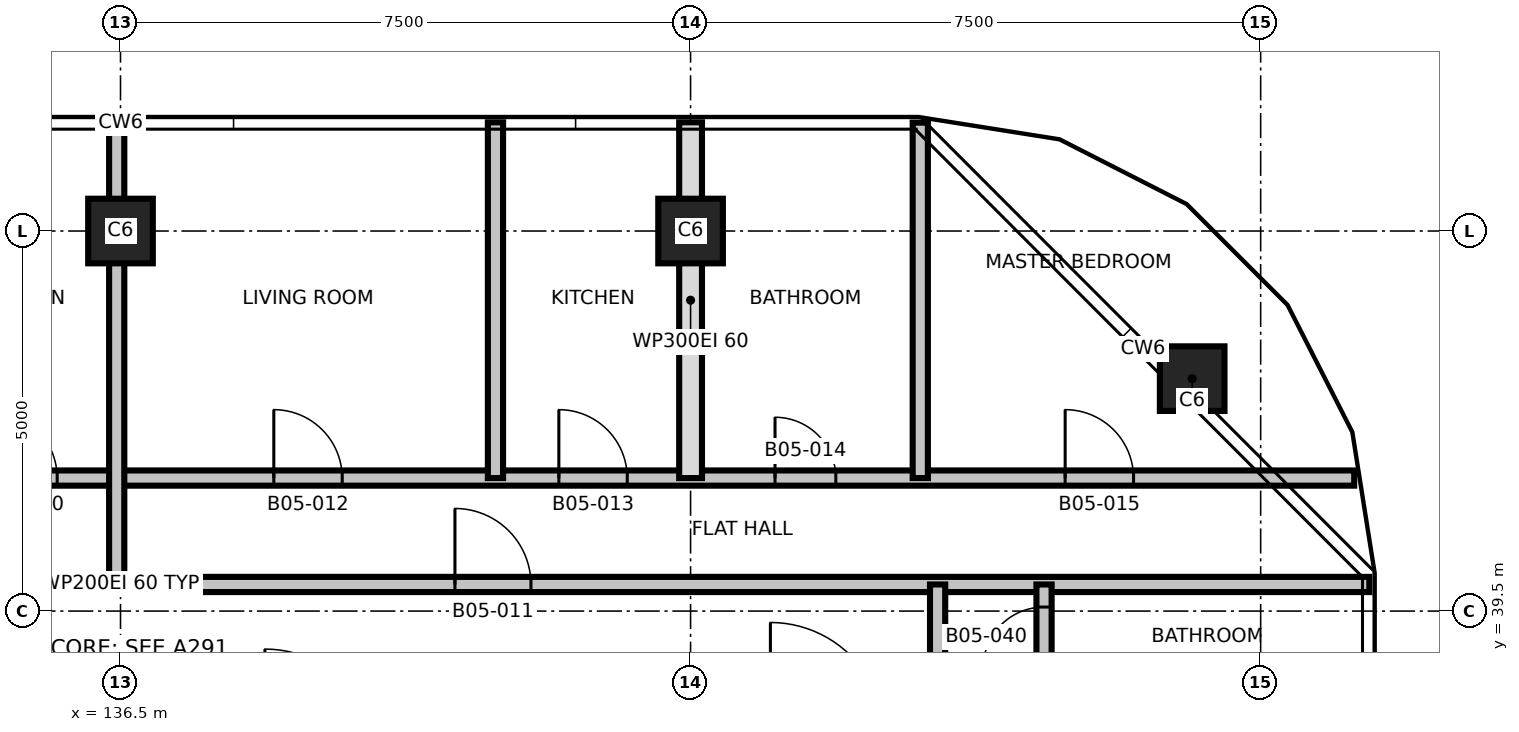
"""IFC4 building model, lengths in metres.
Left out: names, types, materials, properties, quantities, classifications, styles, units other than length and angle.
Written with IfcOpenShell. Run it as: python <this file> out.ifc"""

import sys

from ifc_helpers import new_model, si_unit, direction, frame, frame_2d, origin, origin_2d, place, context, subcontext, project, spatial, rectangle, extrude, element, fill, save


model = new_model("IFC4")
c1 = context("Model", 3, precision=1e-05, world=origin(), true_north=direction((0.0, 1.0)))
c2 = subcontext(c1, "Body", "Model", "MODEL_VIEW")
j1 = project(units=[si_unit("LENGTHUNIT", "METRE"), si_unit("PLANEANGLEUNIT", "RADIAN")], contexts=[c1])
p1 = place(None, origin())
s1 = spatial("IfcSite", under=j1, at=p1, CompositionType="ELEMENT")
p2 = place(p1, origin())
s2 = spatial("IfcBuilding", under=s1, at=p2, CompositionType="ELEMENT")
p3 = place(p2, frame((0.0, 0.0, 74.2)))
s3 = spatial("IfcBuildingStorey", under=s2, at=p3, CompositionType="ELEMENT", Elevation=74.2)
for number, where, z_axis, x_axis in (
    (1, (150.599, 42.558, 0.0), (0.0, 0.0, 1.0), (1.0, 0.0, 0.0)),
    (2, (136.5, 44.5, 0.0), (0.0, 0.0, 1.0), (1.0, 0.0, 0.0)),
    (3, (144.0, 44.5, 0.0), (0.0, 0.0, 1.0), (1.0, 0.0, 0.0)),
):
    element("IfcColumn", number, at=place(p3, frame(where, z_axis=z_axis, x_axis=x_axis)), inside=s3, PredefinedType="COLUMN", context=c2, shape_type="SweptSolid", body=[
        extrude(rectangle(XDim=0.85, YDim=0.85, at=origin_2d()), origin(), (0.0, 0.0, 1.0), 3.7),
    ])
p4 = place(p3, frame((120.07, 39.85, 0.0), z_axis=(0.0, 0.0, 1.0), x_axis=(1.0, 0.0, 0.0)))
e4 = element("IfcWall", 4, at=p4, inside=s3, PredefinedType="PARTITIONING", context=c2, shape_type="SweptSolid", body=[
    extrude(rectangle(XDim=32.86, YDim=0.2, at=frame_2d((16.43, 0.0))), origin(), (0.0, 0.0, 1.0), 3.4),
])
p5 = place(p4, frame((11.03, 0.0, 0.0)))
e5 = element("IfcOpeningElement", 5, at=p5, cuts=e4, PredefinedType="OPENING", context=c2, shape_type="SweptSolid", body=[
    extrude(rectangle(XDim=1.0, YDim=2.1, at=frame_2d((0.5, 1.05))), frame((0.0, 0.11, 0.0), z_axis=(0.0, -1.0, 0.0), x_axis=(1.0, 0.0, 0.0)), (0.0, 0.0, 1.0), 0.22),
])
p6 = place(p4, frame((20.83, 0.0, 0.0)))
e6 = element("IfcOpeningElement", 6, at=p6, cuts=e4, PredefinedType="OPENING", context=c2, shape_type="SweptSolid", body=[
    extrude(rectangle(XDim=1.0, YDim=2.1, at=frame_2d((0.5, 1.05))), frame((0.0, 0.11, 0.0), z_axis=(0.0, -1.0, 0.0), x_axis=(1.0, 0.0, 0.0)), (0.0, 0.0, 1.0), 0.22),
])
p7 = place(p3, frame((120.269, 41.25, 0.0), z_axis=(0.0, 0.0, 1.0), x_axis=(1.0, 0.0, 0.0)))
e7 = element("IfcWall", 7, at=p7, inside=s3, PredefinedType="PARTITIONING", context=c2, shape_type="SweptSolid", body=[
    extrude(rectangle(XDim=32.462, YDim=0.2, at=frame_2d((16.231, 0.0))), origin(), (0.0, 0.0, 1.0), 3.4),
])
p8 = place(p7, frame((0.414, 0.0, 0.0)))
e8 = element("IfcOpeningElement", 8, at=p8, cuts=e7, PredefinedType="OPENING", context=c2, shape_type="SweptSolid", body=[
    extrude(rectangle(XDim=0.9, YDim=2.1, at=frame_2d((0.45, 1.05))), frame((0.0, 0.11, 0.0), z_axis=(0.0, -1.0, 0.0), x_axis=(1.0, 0.0, 0.0)), (0.0, 0.0, 1.0), 0.22),
])
p9 = place(p7, frame((4.581, 0.0, 0.0)))
e9 = element("IfcOpeningElement", 9, at=p9, cuts=e7, PredefinedType="OPENING", context=c2, shape_type="SweptSolid", body=[
    extrude(rectangle(XDim=0.9, YDim=2.1, at=frame_2d((0.45, 1.05))), frame((0.0, 0.11, 0.0), z_axis=(0.0, -1.0, 0.0), x_axis=(1.0, 0.0, 0.0)), (0.0, 0.0, 1.0), 0.22),
])
p10 = place(p7, frame((7.381, 0.0, 0.0)))
e10 = element("IfcOpeningElement", 10, at=p10, cuts=e7, PredefinedType="OPENING", context=c2, shape_type="SweptSolid", body=[
    extrude(rectangle(XDim=0.8, YDim=2.1, at=frame_2d((0.4, 1.05))), frame((0.0, 0.11, 0.0), z_axis=(0.0, -1.0, 0.0), x_axis=(1.0, 0.0, 0.0)), (0.0, 0.0, 1.0), 0.22),
])
p11 = place(p7, frame((10.748, 0.0, 0.0)))
e11 = element("IfcOpeningElement", 11, at=p11, cuts=e7, PredefinedType="OPENING", context=c2, shape_type="SweptSolid", body=[
    extrude(rectangle(XDim=0.9, YDim=2.1, at=frame_2d((0.45, 1.05))), frame((0.0, 0.11, 0.0), z_axis=(0.0, -1.0, 0.0), x_axis=(1.0, 0.0, 0.0)), (0.0, 0.0, 1.0), 0.22),
])
p12 = place(p7, frame((14.498, 0.0, 0.0)))
e12 = element("IfcOpeningElement", 12, at=p12, cuts=e7, PredefinedType="OPENING", context=c2, shape_type="SweptSolid", body=[
    extrude(rectangle(XDim=0.9, YDim=2.1, at=frame_2d((0.45, 1.05))), frame((0.0, 0.11, 0.0), z_axis=(0.0, -1.0, 0.0), x_axis=(1.0, 0.0, 0.0)), (0.0, 0.0, 1.0), 0.22),
])
p13 = place(p7, frame((18.248, 0.0, 0.0)))
e13 = element("IfcOpeningElement", 13, at=p13, cuts=e7, PredefinedType="OPENING", context=c2, shape_type="SweptSolid", body=[
    extrude(rectangle(XDim=0.9, YDim=2.1, at=frame_2d((0.45, 1.05))), frame((0.0, 0.11, 0.0), z_axis=(0.0, -1.0, 0.0), x_axis=(1.0, 0.0, 0.0)), (0.0, 0.0, 1.0), 0.22),
])
p14 = place(p7, frame((21.998, 0.0, 0.0)))
e14 = element("IfcOpeningElement", 14, at=p14, cuts=e7, PredefinedType="OPENING", context=c2, shape_type="SweptSolid", body=[
    extrude(rectangle(XDim=0.9, YDim=2.1, at=frame_2d((0.45, 1.05))), frame((0.0, 0.11, 0.0), z_axis=(0.0, -1.0, 0.0), x_axis=(1.0, 0.0, 0.0)), (0.0, 0.0, 1.0), 0.22),
])
p15 = place(p7, frame((24.842, 0.0, 0.0)))
e15 = element("IfcOpeningElement", 15, at=p15, cuts=e7, PredefinedType="OPENING", context=c2, shape_type="SweptSolid", body=[
    extrude(rectangle(XDim=0.8, YDim=2.1, at=frame_2d((0.4, 1.05))), frame((0.0, 0.11, 0.0), z_axis=(0.0, -1.0, 0.0), x_axis=(1.0, 0.0, 0.0)), (0.0, 0.0, 1.0), 0.22),
])
p16 = place(p7, frame((28.659, 0.0, 0.0)))
e16 = element("IfcOpeningElement", 16, at=p16, cuts=e7, PredefinedType="OPENING", context=c2, shape_type="SweptSolid", body=[
    extrude(rectangle(XDim=0.9, YDim=2.1, at=frame_2d((0.45, 1.05))), frame((0.0, 0.11, 0.0), z_axis=(0.0, -1.0, 0.0), x_axis=(1.0, 0.0, 0.0)), (0.0, 0.0, 1.0), 0.22),
])
p17 = place(p3, frame((136.45, 39.85, 0.0), z_axis=(0.0, 0.0, 1.0), x_axis=(0.0, 1.0, 0.0)))
e17 = element("IfcWall", 17, at=p17, inside=s3, PredefinedType="PARTITIONING", context=c2, shape_type="SweptSolid", body=[
    extrude(rectangle(XDim=6.08, YDim=0.2, at=frame_2d((3.04, 0.0))), origin(), (0.0, 0.0, 1.0), 3.4),
])
p18 = place(p3, frame((141.433, 41.25, 0.0), z_axis=(0.0, 0.0, 1.0), x_axis=(0.0, 1.0, 0.0)))
e18 = element("IfcWall", 18, at=p18, inside=s3, PredefinedType="PARTITIONING", context=c2, shape_type="SweptSolid", body=[
    extrude(rectangle(XDim=4.68, YDim=0.2, at=frame_2d((2.34, 0.0))), origin(), (0.0, 0.0, 1.0), 3.4),
])
p19 = place(p3, frame((144.0, 41.25, 0.0), z_axis=(0.0, 0.0, 1.0), x_axis=(0.0, 1.0, 0.0)))
e19 = element("IfcWall", 19, at=p19, inside=s3, PredefinedType="PARTITIONING", context=c2, shape_type="SweptSolid", body=[
    extrude(rectangle(XDim=4.68, YDim=0.3, at=frame_2d((2.34, 0.0))), origin(), (0.0, 0.0, 1.0), 3.4),
])
p20 = place(p3, frame((147.022, 41.25, 0.0), z_axis=(0.0, 0.0, 1.0), x_axis=(0.0, 1.0, 0.0)))
e20 = element("IfcWall", 20, at=p20, inside=s3, PredefinedType="PARTITIONING", context=c2, shape_type="SweptSolid", body=[
    extrude(rectangle(XDim=4.676, YDim=0.2, at=frame_2d((2.338, 0.0))), origin(), (0.0, 0.0, 1.0), 3.4),
])
p21 = place(p3, frame((147.25, 22.15, 0.0), z_axis=(0.0, 0.0, 1.0), x_axis=(0.0, 1.0, 0.0)))
e21 = element("IfcWall", 21, at=p21, inside=s3, PredefinedType="PARTITIONING", context=c2, shape_type="SweptSolid", body=[
    extrude(rectangle(XDim=17.7, YDim=0.2, at=frame_2d((8.85, 0.0))), origin(), (0.0, 0.0, 1.0), 3.4),
])
p22 = place(p21, frame((2.65, 0.0, 0.0)))
e22 = element("IfcOpeningElement", 22, at=p22, cuts=e21, PredefinedType="OPENING", context=c2, shape_type="SweptSolid", body=[
    extrude(rectangle(XDim=1.0, YDim=2.1, at=frame_2d((0.5, 1.05))), frame((0.0, 0.11, 0.0), z_axis=(0.0, -1.0, 0.0), x_axis=(1.0, 0.0, 0.0)), (0.0, 0.0, 1.0), 0.22),
])
p23 = place(p3, frame((148.65, 22.15, 0.0), z_axis=(0.0, 0.0, 1.0), x_axis=(0.0, 1.0, 0.0)))
e23 = element("IfcWall", 23, at=p23, inside=s3, PredefinedType="PARTITIONING", context=c2, shape_type="SweptSolid", body=[
    extrude(rectangle(XDim=17.7, YDim=0.2, at=frame_2d((8.85, 0.0))), origin(), (0.0, 0.0, 1.0), 3.4),
])
p24 = place(p23, frame((1.725, 0.0, 0.0)))
e24 = element("IfcOpeningElement", 24, at=p24, cuts=e23, PredefinedType="OPENING", context=c2, shape_type="SweptSolid", body=[
    extrude(rectangle(XDim=0.9, YDim=2.1, at=frame_2d((0.45, 1.05))), frame((0.0, 0.11, 0.0), z_axis=(0.0, -1.0, 0.0), x_axis=(1.0, 0.0, 0.0)), (0.0, 0.0, 1.0), 0.22),
])
p25 = place(p23, frame((6.867, 0.0, 0.0)))
e25 = element("IfcOpeningElement", 25, at=p25, cuts=e23, PredefinedType="OPENING", context=c2, shape_type="SweptSolid", body=[
    extrude(rectangle(XDim=0.9, YDim=2.1, at=frame_2d((0.45, 1.05))), frame((0.0, 0.11, 0.0), z_axis=(0.0, -1.0, 0.0), x_axis=(1.0, 0.0, 0.0)), (0.0, 0.0, 1.0), 0.22),
])
p26 = place(p23, frame((11.367, 0.0, 0.0)))
e26 = element("IfcOpeningElement", 26, at=p26, cuts=e23, PredefinedType="OPENING", context=c2, shape_type="SweptSolid", body=[
    extrude(rectangle(XDim=0.9, YDim=2.1, at=frame_2d((0.45, 1.05))), frame((0.0, 0.11, 0.0), z_axis=(0.0, -1.0, 0.0), x_axis=(1.0, 0.0, 0.0)), (0.0, 0.0, 1.0), 0.22),
])
p27 = place(p23, frame((14.378, 0.0, 0.0)))
e27 = element("IfcOpeningElement", 27, at=p27, cuts=e23, PredefinedType="OPENING", context=c2, shape_type="SweptSolid", body=[
    extrude(rectangle(XDim=0.9, YDim=2.1, at=frame_2d((0.45, 1.05))), frame((0.0, 0.11, 0.0), z_axis=(0.0, -1.0, 0.0), x_axis=(1.0, 0.0, 0.0)), (0.0, 0.0, 1.0), 0.22),
])
p28 = place(p23, frame((16.603, 0.0, 0.0)))
e28 = element("IfcOpeningElement", 28, at=p28, cuts=e23, PredefinedType="OPENING", context=c2, shape_type="SweptSolid", body=[
    extrude(rectangle(XDim=0.8, YDim=2.1, at=frame_2d((0.4, 1.05))), frame((0.0, 0.11, 0.0), z_axis=(0.0, -1.0, 0.0), x_axis=(1.0, 0.0, 0.0)), (0.0, 0.0, 1.0), 0.22),
])
p29 = place(p12, origin())
e29 = element("IfcDoor", 29, at=p29, inside=s3, OperationType="SINGLE_SWING_RIGHT", PredefinedType="DOOR", context=c2, shape_type="SweptSolid", body=[
    extrude(rectangle(XDim=0.9, YDim=2.1, at=frame_2d((0.45, 1.05))), frame((0.0, 0.025, 0.0), z_axis=(0.0, -1.0, 0.0), x_axis=(1.0, 0.0, 0.0)), (0.0, 0.0, 1.0), 0.05),
])
fill(e12, e29)
p30 = place(p6, origin())
e30 = element("IfcDoor", 30, at=p30, inside=s3, OperationType="SINGLE_SWING_LEFT", PredefinedType="DOOR", context=c2, shape_type="SweptSolid", body=[
    extrude(rectangle(XDim=1.0, YDim=2.1, at=frame_2d((0.5, 1.05))), frame((0.0, 0.025, 0.0), z_axis=(0.0, -1.0, 0.0), x_axis=(1.0, 0.0, 0.0)), (0.0, 0.0, 1.0), 0.05),
])
fill(e6, e30)
p31 = place(p13, origin())
e31 = element("IfcDoor", 31, at=p31, inside=s3, OperationType="SINGLE_SWING_RIGHT", PredefinedType="DOOR", context=c2, shape_type="SweptSolid", body=[
    extrude(rectangle(XDim=0.9, YDim=2.1, at=frame_2d((0.45, 1.05))), frame((0.0, 0.025, 0.0), z_axis=(0.0, -1.0, 0.0), x_axis=(1.0, 0.0, 0.0)), (0.0, 0.0, 1.0), 0.05),
])
fill(e13, e31)
p32 = place(p14, origin())
e32 = element("IfcDoor", 32, at=p32, inside=s3, OperationType="SINGLE_SWING_LEFT", PredefinedType="DOOR", context=c2, shape_type="SweptSolid", body=[
    extrude(rectangle(XDim=0.9, YDim=2.1, at=frame_2d((0.45, 1.05))), frame((0.0, 0.025, 0.0), z_axis=(0.0, -1.0, 0.0), x_axis=(1.0, 0.0, 0.0)), (0.0, 0.0, 1.0), 0.05),
])
fill(e14, e32)
p33 = place(p15, origin())
e33 = element("IfcDoor", 33, at=p33, inside=s3, OperationType="SINGLE_SWING_RIGHT", PredefinedType="DOOR", context=c2, shape_type="SweptSolid", body=[
    extrude(rectangle(XDim=0.8, YDim=2.1, at=frame_2d((0.4, 1.05))), frame((0.0, 0.025, 0.0), z_axis=(0.0, -1.0, 0.0), x_axis=(1.0, 0.0, 0.0)), (0.0, 0.0, 1.0), 0.05),
])
fill(e15, e33)
p34 = place(p16, origin())
e34 = element("IfcDoor", 34, at=p34, inside=s3, OperationType="SINGLE_SWING_LEFT", PredefinedType="DOOR", context=c2, shape_type="SweptSolid", body=[
    extrude(rectangle(XDim=0.9, YDim=2.1, at=frame_2d((0.45, 1.05))), frame((0.0, 0.025, 0.0), z_axis=(0.0, -1.0, 0.0), x_axis=(1.0, 0.0, 0.0)), (0.0, 0.0, 1.0), 0.05),
])
fill(e16, e34)
p35 = place(p28, origin())
e35 = element("IfcDoor", 35, at=p35, inside=s3, OperationType="SINGLE_SWING_RIGHT", PredefinedType="DOOR", context=c2, shape_type="SweptSolid", body=[
    extrude(rectangle(XDim=0.8, YDim=2.1, at=frame_2d((0.4, 1.05))), frame((0.0, 0.025, 0.0), z_axis=(0.0, -1.0, 0.0), x_axis=(1.0, 0.0, 0.0)), (0.0, 0.0, 1.0), 0.05),
])
fill(e28, e35)
save(model, sys.argv[1])
